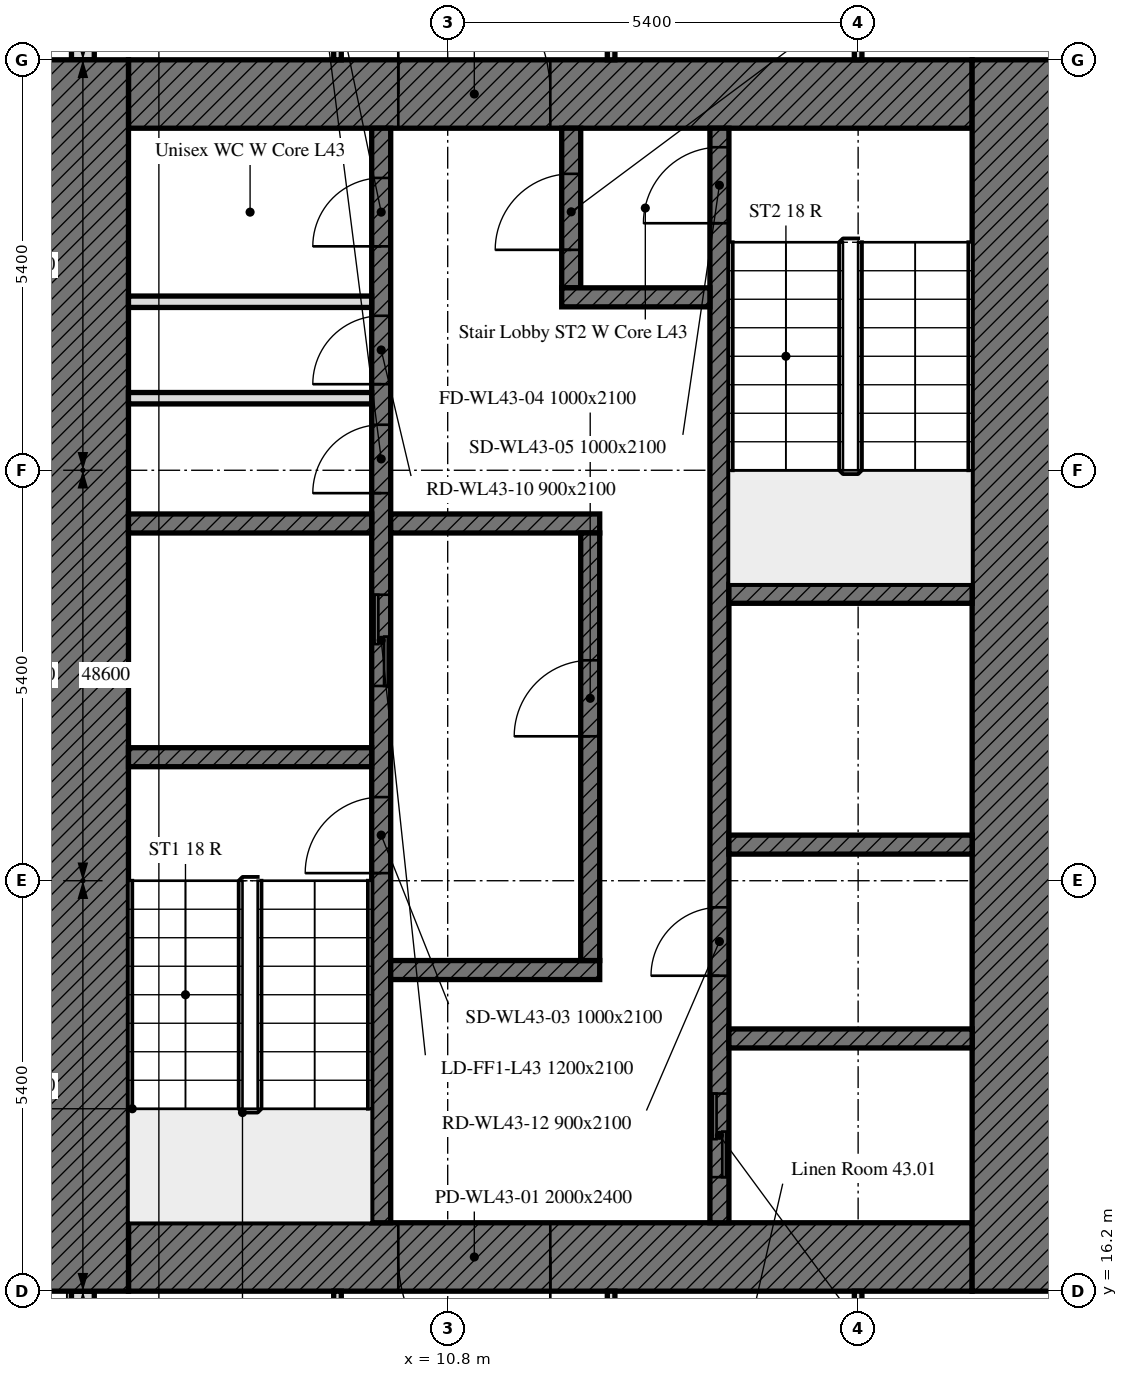
"""IFC4 building model, lengths in metres.
Left out: names, types, materials, properties, quantities, classifications, styles, units other than length and angle.
Written with IfcOpenShell. Run it as: python <this file> out.ifc"""

import sys

from ifc_helpers import new_model, si_unit, direction, frame, frame_2d, origin, place, context, subcontext, project, spatial, rectangle, extrude, element, fill, save


model = new_model("IFC4")
c1 = context("Model", 3, precision=1e-05, world=origin(), true_north=direction((0.0, 1.0)))
c2 = subcontext(c1, "Body", "Model", "MODEL_VIEW")
j1 = project(units=[si_unit("LENGTHUNIT", "METRE"), si_unit("PLANEANGLEUNIT", "RADIAN")], contexts=[c1])
p1 = place(None, origin())
s1 = spatial("IfcSite", under=j1, at=p1, CompositionType="ELEMENT")
p2 = place(p1, origin())
s2 = spatial("IfcBuilding", under=s1, at=p2, CompositionType="ELEMENT")
p3 = place(p2, frame((0.0, 0.0, 180.7)))
s3 = spatial("IfcBuildingStorey", under=s2, at=p3, CompositionType="ELEMENT", Elevation=180.7)
p4 = place(p3, frame((6.0, 43.014, 0.0), z_axis=(0.0, 0.0, 1.0), x_axis=(0.0, -1.0, 0.0)))
e1 = element("IfcWall", 1, at=p4, inside=s3, PredefinedType="SOLIDWALL", context=c2, shape_type="SweptSolid", body=[
    extrude(rectangle(XDim=10.614, YDim=0.3, at=frame_2d((5.307, 0.0))), origin(), (0.0, 0.0, 1.0), 3.0),
])
p5 = place(p4, frame((1.164, 0.0, 0.9)))
e2 = element("IfcOpeningElement", 2, at=p5, cuts=e1, PredefinedType="OPENING", context=c2, shape_type="SweptSolid", body=[
    extrude(rectangle(XDim=1.1, YDim=1.7, at=frame_2d((0.55, 0.85))), frame((0.0, 0.16, 0.0), z_axis=(0.0, -1.0, 0.0), x_axis=(1.0, 0.0, 0.0)), (0.0, 0.0, 1.0), 0.32),
])
p6 = place(p4, frame((2.764, 0.0, 0.9)))
e3 = element("IfcOpeningElement", 3, at=p6, cuts=e1, PredefinedType="OPENING", context=c2, shape_type="SweptSolid", body=[
    extrude(rectangle(XDim=1.1, YDim=1.7, at=frame_2d((0.55, 0.85))), frame((0.0, 0.16, 0.0), z_axis=(0.0, -1.0, 0.0), x_axis=(1.0, 0.0, 0.0)), (0.0, 0.0, 1.0), 0.32),
])
p7 = place(p4, frame((6.564, 0.0, 0.9)))
e4 = element("IfcOpeningElement", 4, at=p7, cuts=e1, PredefinedType="OPENING", context=c2, shape_type="SweptSolid", body=[
    extrude(rectangle(XDim=1.1, YDim=1.7, at=frame_2d((0.55, 0.85))), frame((0.0, 0.16, 0.0), z_axis=(0.0, -1.0, 0.0), x_axis=(1.0, 0.0, 0.0)), (0.0, 0.0, 1.0), 0.32),
])
p8 = place(p4, frame((8.164, 0.0, 0.9)))
e5 = element("IfcOpeningElement", 5, at=p8, cuts=e1, PredefinedType="OPENING", context=c2, shape_type="SweptSolid", body=[
    extrude(rectangle(XDim=1.1, YDim=1.7, at=frame_2d((0.55, 0.85))), frame((0.0, 0.16, 0.0), z_axis=(0.0, -1.0, 0.0), x_axis=(1.0, 0.0, 0.0)), (0.0, 0.0, 1.0), 0.32),
])
p9 = place(p3, frame((6.0, 16.2, 0.0), z_axis=(0.0, 0.0, 1.0), x_axis=(0.0, -1.0, 0.0)))
e6 = element("IfcWall", 6, at=p9, inside=s3, PredefinedType="SOLIDWALL", context=c2, shape_type="SweptSolid", body=[
    extrude(rectangle(XDim=5.214, YDim=0.3, at=frame_2d((2.607, 0.0))), origin(), (0.0, 0.0, 1.0), 3.0),
])
p10 = place(p9, frame((1.35, 0.0, 0.9)))
e7 = element("IfcOpeningElement", 7, at=p10, cuts=e6, PredefinedType="OPENING", context=c2, shape_type="SweptSolid", body=[
    extrude(rectangle(XDim=1.1, YDim=1.7, at=frame_2d((0.55, 0.85))), frame((0.0, 0.16, 0.0), z_axis=(0.0, -1.0, 0.0), x_axis=(1.0, 0.0, 0.0)), (0.0, 0.0, 1.0), 0.32),
])
p11 = place(p9, frame((2.95, 0.0, 0.9)))
e8 = element("IfcOpeningElement", 8, at=p11, cuts=e6, PredefinedType="OPENING", context=c2, shape_type="SweptSolid", body=[
    extrude(rectangle(XDim=1.1, YDim=1.7, at=frame_2d((0.55, 0.85))), frame((0.0, 0.16, 0.0), z_axis=(0.0, -1.0, 0.0), x_axis=(1.0, 0.0, 0.0)), (0.0, 0.0, 1.0), 0.32),
])
p12 = place(p3, frame((17.7, 16.65, 0.0), z_axis=(0.0, 0.0, 1.0), x_axis=(-1.0, 0.0, 0.0)))
e9 = element("IfcWall", 9, at=p12, inside=s3, PredefinedType="SOLIDWALL", context=c2, shape_type="SweptSolid", body=[
    extrude(rectangle(XDim=11.1, YDim=0.9, at=frame_2d((5.55, 0.0))), origin(), (0.0, 0.0, 1.0), 3.0),
])
p13 = place(p12, frame((5.55, 0.0, 0.0)))
e10 = element("IfcOpeningElement", 10, at=p13, cuts=e9, PredefinedType="OPENING", context=c2, shape_type="SweptSolid", body=[
    extrude(rectangle(XDim=2.0, YDim=2.4, at=frame_2d((1.0, 1.2))), frame((0.0, 0.45, 0.0), z_axis=(0.0, -1.0, 0.0), x_axis=(1.0, 0.0, 0.0)), (0.0, 0.0, 1.0), 0.9),
])
p14 = place(p3, frame((6.6, 31.95, 0.0), z_axis=(0.0, 0.0, 1.0), x_axis=(1.0, 0.0, 0.0)))
e11 = element("IfcWall", 11, at=p14, inside=s3, PredefinedType="SOLIDWALL", context=c2, shape_type="SweptSolid", body=[
    extrude(rectangle(XDim=11.1, YDim=0.9, at=frame_2d((5.55, 0.0))), origin(), (0.0, 0.0, 1.0), 3.0),
])
p15 = place(p14, frame((3.55, 0.0, 0.0)))
e12 = element("IfcOpeningElement", 12, at=p15, cuts=e11, PredefinedType="OPENING", context=c2, shape_type="SweptSolid", body=[
    extrude(rectangle(XDim=2.0, YDim=2.4, at=frame_2d((1.0, 1.2))), frame((0.0, 0.45, 0.0), z_axis=(0.0, -1.0, 0.0), x_axis=(1.0, 0.0, 0.0)), (0.0, 0.0, 1.0), 0.9),
])
for number, where, z_axis, x_axis in (
    (13, (6.0, 16.2, 0.0), (0.0, 0.0, 1.0), (0.0, 1.0, 0.0)),
    (14, (18.3, 32.4, 0.0), (0.0, 0.0, 1.0), (0.0, -1.0, 0.0)),
):
    element("IfcWall", number, at=place(p3, frame(where, z_axis=z_axis, x_axis=x_axis)), inside=s3, PredefinedType="SOLIDWALL", context=c2, shape_type="SweptSolid", body=[
        extrude(rectangle(XDim=16.2, YDim=1.2, at=frame_2d((8.1, 0.0))), origin(), (0.0, 0.0, 1.0), 3.0),
    ])
p16 = place(p3, frame((9.925, 17.1, 0.0), z_axis=(0.0, 0.0, 1.0), x_axis=(0.0, 1.0, 0.0)))
e15 = element("IfcWall", 15, at=p16, inside=s3, PredefinedType="SOLIDWALL", context=c2, shape_type="SweptSolid", body=[
    extrude(rectangle(XDim=14.4, YDim=0.25, at=frame_2d((7.2, 0.0))), origin(), (0.0, 0.0, 1.0), 3.0),
])
p17 = place(p16, frame((4.6, 0.0, 0.0)))
e16 = element("IfcOpeningElement", 16, at=p17, cuts=e15, PredefinedType="OPENING", context=c2, shape_type="SweptSolid", body=[
    extrude(rectangle(XDim=1.0, YDim=2.1, at=frame_2d((0.5, 1.05))), frame((0.0, 0.125, 0.0), z_axis=(0.0, -1.0, 0.0), x_axis=(1.0, 0.0, 0.0)), (0.0, 0.0, 1.0), 0.25),
])
p18 = place(p16, frame((7.062, 0.0, 0.0)))
e17 = element("IfcOpeningElement", 17, at=p18, cuts=e15, PredefinedType="OPENING", context=c2, shape_type="SweptSolid", body=[
    extrude(rectangle(XDim=1.2, YDim=2.1, at=frame_2d((0.6, 1.05))), frame((0.0, 0.125, 0.0), z_axis=(0.0, -1.0, 0.0), x_axis=(1.0, 0.0, 0.0)), (0.0, 0.0, 1.0), 0.25),
])
p19 = place(p16, frame((9.599, 0.0, 0.0)))
e18 = element("IfcOpeningElement", 18, at=p19, cuts=e15, PredefinedType="OPENING", context=c2, shape_type="SweptSolid", body=[
    extrude(rectangle(XDim=0.9, YDim=2.1, at=frame_2d((0.45, 1.05))), frame((0.0, 0.125, 0.0), z_axis=(0.0, -1.0, 0.0), x_axis=(1.0, 0.0, 0.0)), (0.0, 0.0, 1.0), 0.25),
])
p20 = place(p16, frame((11.032, 0.0, 0.0)))
e19 = element("IfcOpeningElement", 19, at=p20, cuts=e15, PredefinedType="OPENING", context=c2, shape_type="SweptSolid", body=[
    extrude(rectangle(XDim=0.9, YDim=2.1, at=frame_2d((0.45, 1.05))), frame((0.0, 0.125, 0.0), z_axis=(0.0, -1.0, 0.0), x_axis=(1.0, 0.0, 0.0)), (0.0, 0.0, 1.0), 0.25),
])
p21 = place(p16, frame((12.846, 0.0, 0.0)))
e20 = element("IfcOpeningElement", 20, at=p21, cuts=e15, PredefinedType="OPENING", context=c2, shape_type="SweptSolid", body=[
    extrude(rectangle(XDim=0.9, YDim=2.1, at=frame_2d((0.45, 1.05))), frame((0.0, 0.125, 0.0), z_axis=(0.0, -1.0, 0.0), x_axis=(1.0, 0.0, 0.0)), (0.0, 0.0, 1.0), 0.25),
])
p22 = place(p3, frame((14.375, 17.1, 0.0), z_axis=(0.0, 0.0, 1.0), x_axis=(0.0, 1.0, 0.0)))
e21 = element("IfcWall", 21, at=p22, inside=s3, PredefinedType="SOLIDWALL", context=c2, shape_type="SweptSolid", body=[
    extrude(rectangle(XDim=14.4, YDim=0.25, at=frame_2d((7.2, 0.0))), origin(), (0.0, 0.0, 1.0), 3.0),
])
p23 = place(p22, frame((13.15, 0.0, 0.0)))
e22 = element("IfcOpeningElement", 22, at=p23, cuts=e21, PredefinedType="OPENING", context=c2, shape_type="SweptSolid", body=[
    extrude(rectangle(XDim=1.0, YDim=2.1, at=frame_2d((0.5, 1.05))), frame((0.0, 0.125, 0.0), z_axis=(0.0, -1.0, 0.0), x_axis=(1.0, 0.0, 0.0)), (0.0, 0.0, 1.0), 0.25),
])
p24 = place(p22, frame((0.6, 0.0, 0.0)))
e23 = element("IfcOpeningElement", 23, at=p24, cuts=e21, PredefinedType="OPENING", context=c2, shape_type="SweptSolid", body=[
    extrude(rectangle(XDim=1.1, YDim=2.1, at=frame_2d((0.55, 1.05))), frame((0.0, 0.125, 0.0), z_axis=(0.0, -1.0, 0.0), x_axis=(1.0, 0.0, 0.0)), (0.0, 0.0, 1.0), 0.25),
])
p25 = place(p22, frame((3.25, 0.0, 0.0)))
e24 = element("IfcOpeningElement", 24, at=p25, cuts=e21, PredefinedType="OPENING", context=c2, shape_type="SweptSolid", body=[
    extrude(rectangle(XDim=0.9, YDim=2.1, at=frame_2d((0.45, 1.05))), frame((0.0, 0.125, 0.0), z_axis=(0.0, -1.0, 0.0), x_axis=(1.0, 0.0, 0.0)), (0.0, 0.0, 1.0), 0.25),
])
for number, where, z_axis, x_axis in (
    (25, (6.6, 23.225, 0.0), (0.0, 0.0, 1.0), (1.0, 0.0, 0.0)),
    (26, (14.5, 25.375, 0.0), (0.0, 0.0, 1.0), (1.0, 0.0, 0.0)),
    (27, (14.5, 22.075, 0.0), (0.0, 0.0, 1.0), (1.0, 0.0, 0.0)),
    (28, (6.6, 26.3, 0.0), (0.0, 0.0, 1.0), (1.0, 0.0, 0.0)),
):
    element("IfcWall", number, at=place(p3, frame(where, z_axis=z_axis, x_axis=x_axis)), inside=s3, PredefinedType="SOLIDWALL", context=c2, shape_type="SweptSolid", body=[
        extrude(rectangle(XDim=3.2, YDim=0.25, at=frame_2d((1.6, 0.0))), origin(), (0.0, 0.0, 1.0), 3.0),
    ])
for number, where, z_axis, x_axis in (
    (29, (10.05, 26.3, 0.0), (0.0, 0.0, 1.0), (1.0, 0.0, 0.0)),
    (30, (10.05, 20.425, 0.0), (0.0, 0.0, 1.0), (1.0, 0.0, 0.0)),
):
    element("IfcWall", number, at=place(p3, frame(where, z_axis=z_axis, x_axis=x_axis)), inside=s3, PredefinedType="SOLIDWALL", context=c2, shape_type="SweptSolid", body=[
        extrude(rectangle(XDim=2.75, YDim=0.25, at=frame_2d((1.375, 0.0))), origin(), (0.0, 0.0, 1.0), 3.0),
    ])
p26 = place(p3, frame((12.425, 29.4, 0.0), z_axis=(0.0, 0.0, 1.0), x_axis=(0.0, 1.0, 0.0)))
e31 = element("IfcWall", 31, at=p26, inside=s3, PredefinedType="SOLIDWALL", context=c2, shape_type="SweptSolid", body=[
    extrude(rectangle(XDim=2.1, YDim=0.25, at=frame_2d((1.05, 0.0))), origin(), (0.0, 0.0, 1.0), 3.0),
])
p27 = place(p26, frame((0.5, 0.0, 0.0)))
e32 = element("IfcOpeningElement", 32, at=p27, cuts=e31, PredefinedType="OPENING", context=c2, shape_type="SweptSolid", body=[
    extrude(rectangle(XDim=1.0, YDim=2.1, at=frame_2d((0.5, 1.05))), frame((0.0, 0.125, 0.0), z_axis=(0.0, -1.0, 0.0), x_axis=(1.0, 0.0, 0.0)), (0.0, 0.0, 1.0), 0.25),
])
p28 = place(p3, frame((12.3, 29.275, 0.0), z_axis=(0.0, 0.0, 1.0), x_axis=(1.0, 0.0, 0.0)))
e33 = element("IfcWall", 33, at=p28, inside=s3, PredefinedType="SOLIDWALL", context=c2, shape_type="SweptSolid", body=[
    extrude(rectangle(XDim=1.95, YDim=0.25, at=frame_2d((0.975, 0.0))), origin(), (0.0, 0.0, 1.0), 3.0),
])
p29 = place(p3, frame((12.675, 20.55, 0.0), z_axis=(0.0, 0.0, 1.0), x_axis=(0.0, 1.0, 0.0)))
e34 = element("IfcWall", 34, at=p29, inside=s3, PredefinedType="SOLIDWALL", context=c2, shape_type="SweptSolid", body=[
    extrude(rectangle(XDim=5.625, YDim=0.25, at=frame_2d((2.812, 0.0))), origin(), (0.0, 0.0, 1.0), 3.0),
])
p30 = place(p29, frame((2.95, 0.0, 0.0)))
e35 = element("IfcOpeningElement", 35, at=p30, cuts=e34, PredefinedType="OPENING", context=c2, shape_type="SweptSolid", body=[
    extrude(rectangle(XDim=1.0, YDim=2.1, at=frame_2d((0.5, 1.05))), frame((0.0, 0.125, 0.0), z_axis=(0.0, -1.0, 0.0), x_axis=(1.0, 0.0, 0.0)), (0.0, 0.0, 1.0), 0.25),
])
p31 = place(p3, frame((14.5, 19.525, 0.0), z_axis=(0.0, 0.0, 1.0), x_axis=(1.0, 0.0, 0.0)))
e36 = element("IfcWall", 36, at=p31, inside=s3, PredefinedType="SOLIDWALL", context=c2, shape_type="SweptSolid", body=[
    extrude(rectangle(XDim=3.2, YDim=0.25, at=frame_2d((1.6, 0.0))), origin(), (0.0, 0.0, 1.0), 3.0),
])
for number, where, z_axis, x_axis in (
    (37, (6.6, 27.948, 0.0), (0.0, 0.0, 1.0), (1.0, 0.0, 0.0)),
    (38, (6.6, 29.217, 0.0), (0.0, 0.0, 1.0), (1.0, 0.0, 0.0)),
):
    element("IfcWall", number, at=place(p3, frame(where, z_axis=z_axis, x_axis=x_axis)), inside=s3, PredefinedType="PARTITIONING", context=c2, shape_type="SweptSolid", body=[
        extrude(rectangle(XDim=3.2, YDim=0.15, at=frame_2d((1.6, 0.0))), origin(), (0.0, 0.0, 1.0), 3.0),
    ])
p32 = place(p3, frame((16.2, 37.38, 0.0), z_axis=(0.0, 0.0, 1.0), x_axis=(0.0, -1.0, 0.0)))
e39 = element("IfcWall", 39, at=p32, inside=s3, PredefinedType="PARTITIONING", context=c2, shape_type="SweptSolid", body=[
    extrude(rectangle(XDim=4.98, YDim=0.1, at=frame_2d((2.49, 0.0))), origin(), (0.0, 0.0, 1.0), 2.4),
])
for number, where, z_axis, x_axis in (
    (40, (12.95, 32.4, 0.0), (0.0, 0.0, 1.0), (0.0, 1.0, 0.0)),
    (41, (9.35, 38.625, 0.0), (0.0, 0.0, 1.0), (0.0, -1.0, 0.0)),
):
    element("IfcWall", number, at=place(p3, frame(where, z_axis=z_axis, x_axis=x_axis)), inside=s3, PredefinedType="PARTITIONING", context=c2, shape_type="SweptSolid", body=[
        extrude(rectangle(XDim=6.225, YDim=0.1, at=frame_2d((3.113, 0.0))), origin(), (0.0, 0.0, 1.0), 3.0),
    ])
for number, where, z_axis, x_axis in (
    (42, (16.2, 16.2, 0.0), (0.0, 0.0, 1.0), (0.0, -1.0, 0.0)),
    (43, (9.35, 16.2, 0.0), (0.0, 0.0, 1.0), (0.0, -1.0, 0.0)),
    (44, (12.95, 13.575, 0.0), (0.0, 0.0, 1.0), (0.0, 1.0, 0.0)),
):
    element("IfcWall", number, at=place(p3, frame(where, z_axis=z_axis, x_axis=x_axis)), inside=s3, PredefinedType="PARTITIONING", context=c2, shape_type="SweptSolid", body=[
        extrude(rectangle(XDim=2.625, YDim=0.1, at=frame_2d((1.312, 0.0))), origin(), (0.0, 0.0, 1.0), 3.0),
    ])
p33 = place(p13, origin())
e45 = element("IfcDoor", 45, at=p33, inside=s3, OperationType="DOUBLE_DOOR_SINGLE_SWING", PredefinedType="DOOR", context=c2, shape_type="SweptSolid", body=[
    extrude(rectangle(XDim=2.0, YDim=2.4, at=frame_2d((1.0, 1.2))), frame((0.0, 0.025, 0.0), z_axis=(0.0, -1.0, 0.0), x_axis=(1.0, 0.0, 0.0)), (0.0, 0.0, 1.0), 0.05),
])
fill(e10, e45)
p34 = place(p15, origin())
e46 = element("IfcDoor", 46, at=p34, inside=s3, OperationType="DOUBLE_DOOR_SINGLE_SWING", PredefinedType="DOOR", context=c2, shape_type="SweptSolid", body=[
    extrude(rectangle(XDim=2.0, YDim=2.4, at=frame_2d((1.0, 1.2))), frame((0.0, 0.025, 0.0), z_axis=(0.0, -1.0, 0.0), x_axis=(1.0, 0.0, 0.0)), (0.0, 0.0, 1.0), 0.05),
])
fill(e12, e46)
p35 = place(p17, origin())
e47 = element("IfcDoor", 47, at=p35, inside=s3, OperationType="SINGLE_SWING_LEFT", PredefinedType="DOOR", context=c2, shape_type="SweptSolid", body=[
    extrude(rectangle(XDim=1.0, YDim=2.1, at=frame_2d((0.5, 1.05))), frame((0.0, 0.025, 0.0), z_axis=(0.0, -1.0, 0.0), x_axis=(1.0, 0.0, 0.0)), (0.0, 0.0, 1.0), 0.05),
])
fill(e16, e47)
p36 = place(p30, origin())
e48 = element("IfcDoor", 48, at=p36, inside=s3, OperationType="SINGLE_SWING_LEFT", PredefinedType="DOOR", context=c2, shape_type="SweptSolid", body=[
    extrude(rectangle(XDim=1.0, YDim=2.1, at=frame_2d((0.5, 1.05))), frame((0.0, 0.025, 0.0), z_axis=(0.0, -1.0, 0.0), x_axis=(1.0, 0.0, 0.0)), (0.0, 0.0, 1.0), 0.05),
])
fill(e35, e48)
p37 = place(p23, origin())
e49 = element("IfcDoor", 49, at=p37, inside=s3, OperationType="SINGLE_SWING_LEFT", PredefinedType="DOOR", context=c2, shape_type="SweptSolid", body=[
    extrude(rectangle(XDim=1.0, YDim=2.1, at=frame_2d((0.5, 1.05))), frame((0.0, 0.025, 0.0), z_axis=(0.0, -1.0, 0.0), x_axis=(1.0, 0.0, 0.0)), (0.0, 0.0, 1.0), 0.05),
])
fill(e22, e49)
p38 = place(p27, origin())
e50 = element("IfcDoor", 50, at=p38, inside=s3, OperationType="SINGLE_SWING_LEFT", PredefinedType="DOOR", context=c2, shape_type="SweptSolid", body=[
    extrude(rectangle(XDim=1.0, YDim=2.1, at=frame_2d((0.5, 1.05))), frame((0.0, 0.025, 0.0), z_axis=(0.0, -1.0, 0.0), x_axis=(1.0, 0.0, 0.0)), (0.0, 0.0, 1.0), 0.05),
])
fill(e32, e50)
p39 = place(p18, origin())
e51 = element("IfcDoor", 51, at=p39, inside=s3, OperationType="DOUBLE_DOOR_SLIDING", PredefinedType="DOOR", context=c2, shape_type="SweptSolid", body=[
    extrude(rectangle(XDim=1.2, YDim=2.1, at=frame_2d((0.6, 1.05))), frame((0.0, 0.025, 0.0), z_axis=(0.0, -1.0, 0.0), x_axis=(1.0, 0.0, 0.0)), (0.0, 0.0, 1.0), 0.05),
])
fill(e17, e51)
p40 = place(p24, origin())
e52 = element("IfcDoor", 52, at=p40, inside=s3, OperationType="DOUBLE_DOOR_SLIDING", PredefinedType="DOOR", context=c2, shape_type="SweptSolid", body=[
    extrude(rectangle(XDim=1.1, YDim=2.1, at=frame_2d((0.55, 1.05))), frame((0.0, 0.025, 0.0), z_axis=(0.0, -1.0, 0.0), x_axis=(1.0, 0.0, 0.0)), (0.0, 0.0, 1.0), 0.05),
])
fill(e23, e52)
p41 = place(p19, origin())
e53 = element("IfcDoor", 53, at=p41, inside=s3, OperationType="SINGLE_SWING_LEFT", PredefinedType="DOOR", context=c2, shape_type="SweptSolid", body=[
    extrude(rectangle(XDim=0.9, YDim=2.1, at=frame_2d((0.45, 1.05))), frame((0.0, 0.025, 0.0), z_axis=(0.0, -1.0, 0.0), x_axis=(1.0, 0.0, 0.0)), (0.0, 0.0, 1.0), 0.05),
])
fill(e18, e53)
p42 = place(p20, origin())
e54 = element("IfcDoor", 54, at=p42, inside=s3, OperationType="SINGLE_SWING_LEFT", PredefinedType="DOOR", context=c2, shape_type="SweptSolid", body=[
    extrude(rectangle(XDim=0.9, YDim=2.1, at=frame_2d((0.45, 1.05))), frame((0.0, 0.025, 0.0), z_axis=(0.0, -1.0, 0.0), x_axis=(1.0, 0.0, 0.0)), (0.0, 0.0, 1.0), 0.05),
])
fill(e19, e54)
p43 = place(p21, origin())
e55 = element("IfcDoor", 55, at=p43, inside=s3, OperationType="SINGLE_SWING_LEFT", PredefinedType="DOOR", context=c2, shape_type="SweptSolid", body=[
    extrude(rectangle(XDim=0.9, YDim=2.1, at=frame_2d((0.45, 1.05))), frame((0.0, 0.025, 0.0), z_axis=(0.0, -1.0, 0.0), x_axis=(1.0, 0.0, 0.0)), (0.0, 0.0, 1.0), 0.05),
])
fill(e20, e55)
p44 = place(p25, origin())
e56 = element("IfcDoor", 56, at=p44, inside=s3, OperationType="SINGLE_SWING_LEFT", PredefinedType="DOOR", context=c2, shape_type="SweptSolid", body=[
    extrude(rectangle(XDim=0.9, YDim=2.1, at=frame_2d((0.45, 1.05))), frame((0.0, 0.025, 0.0), z_axis=(0.0, -1.0, 0.0), x_axis=(1.0, 0.0, 0.0)), (0.0, 0.0, 1.0), 0.05),
])
fill(e24, e56)
save(model, sys.argv[1])
